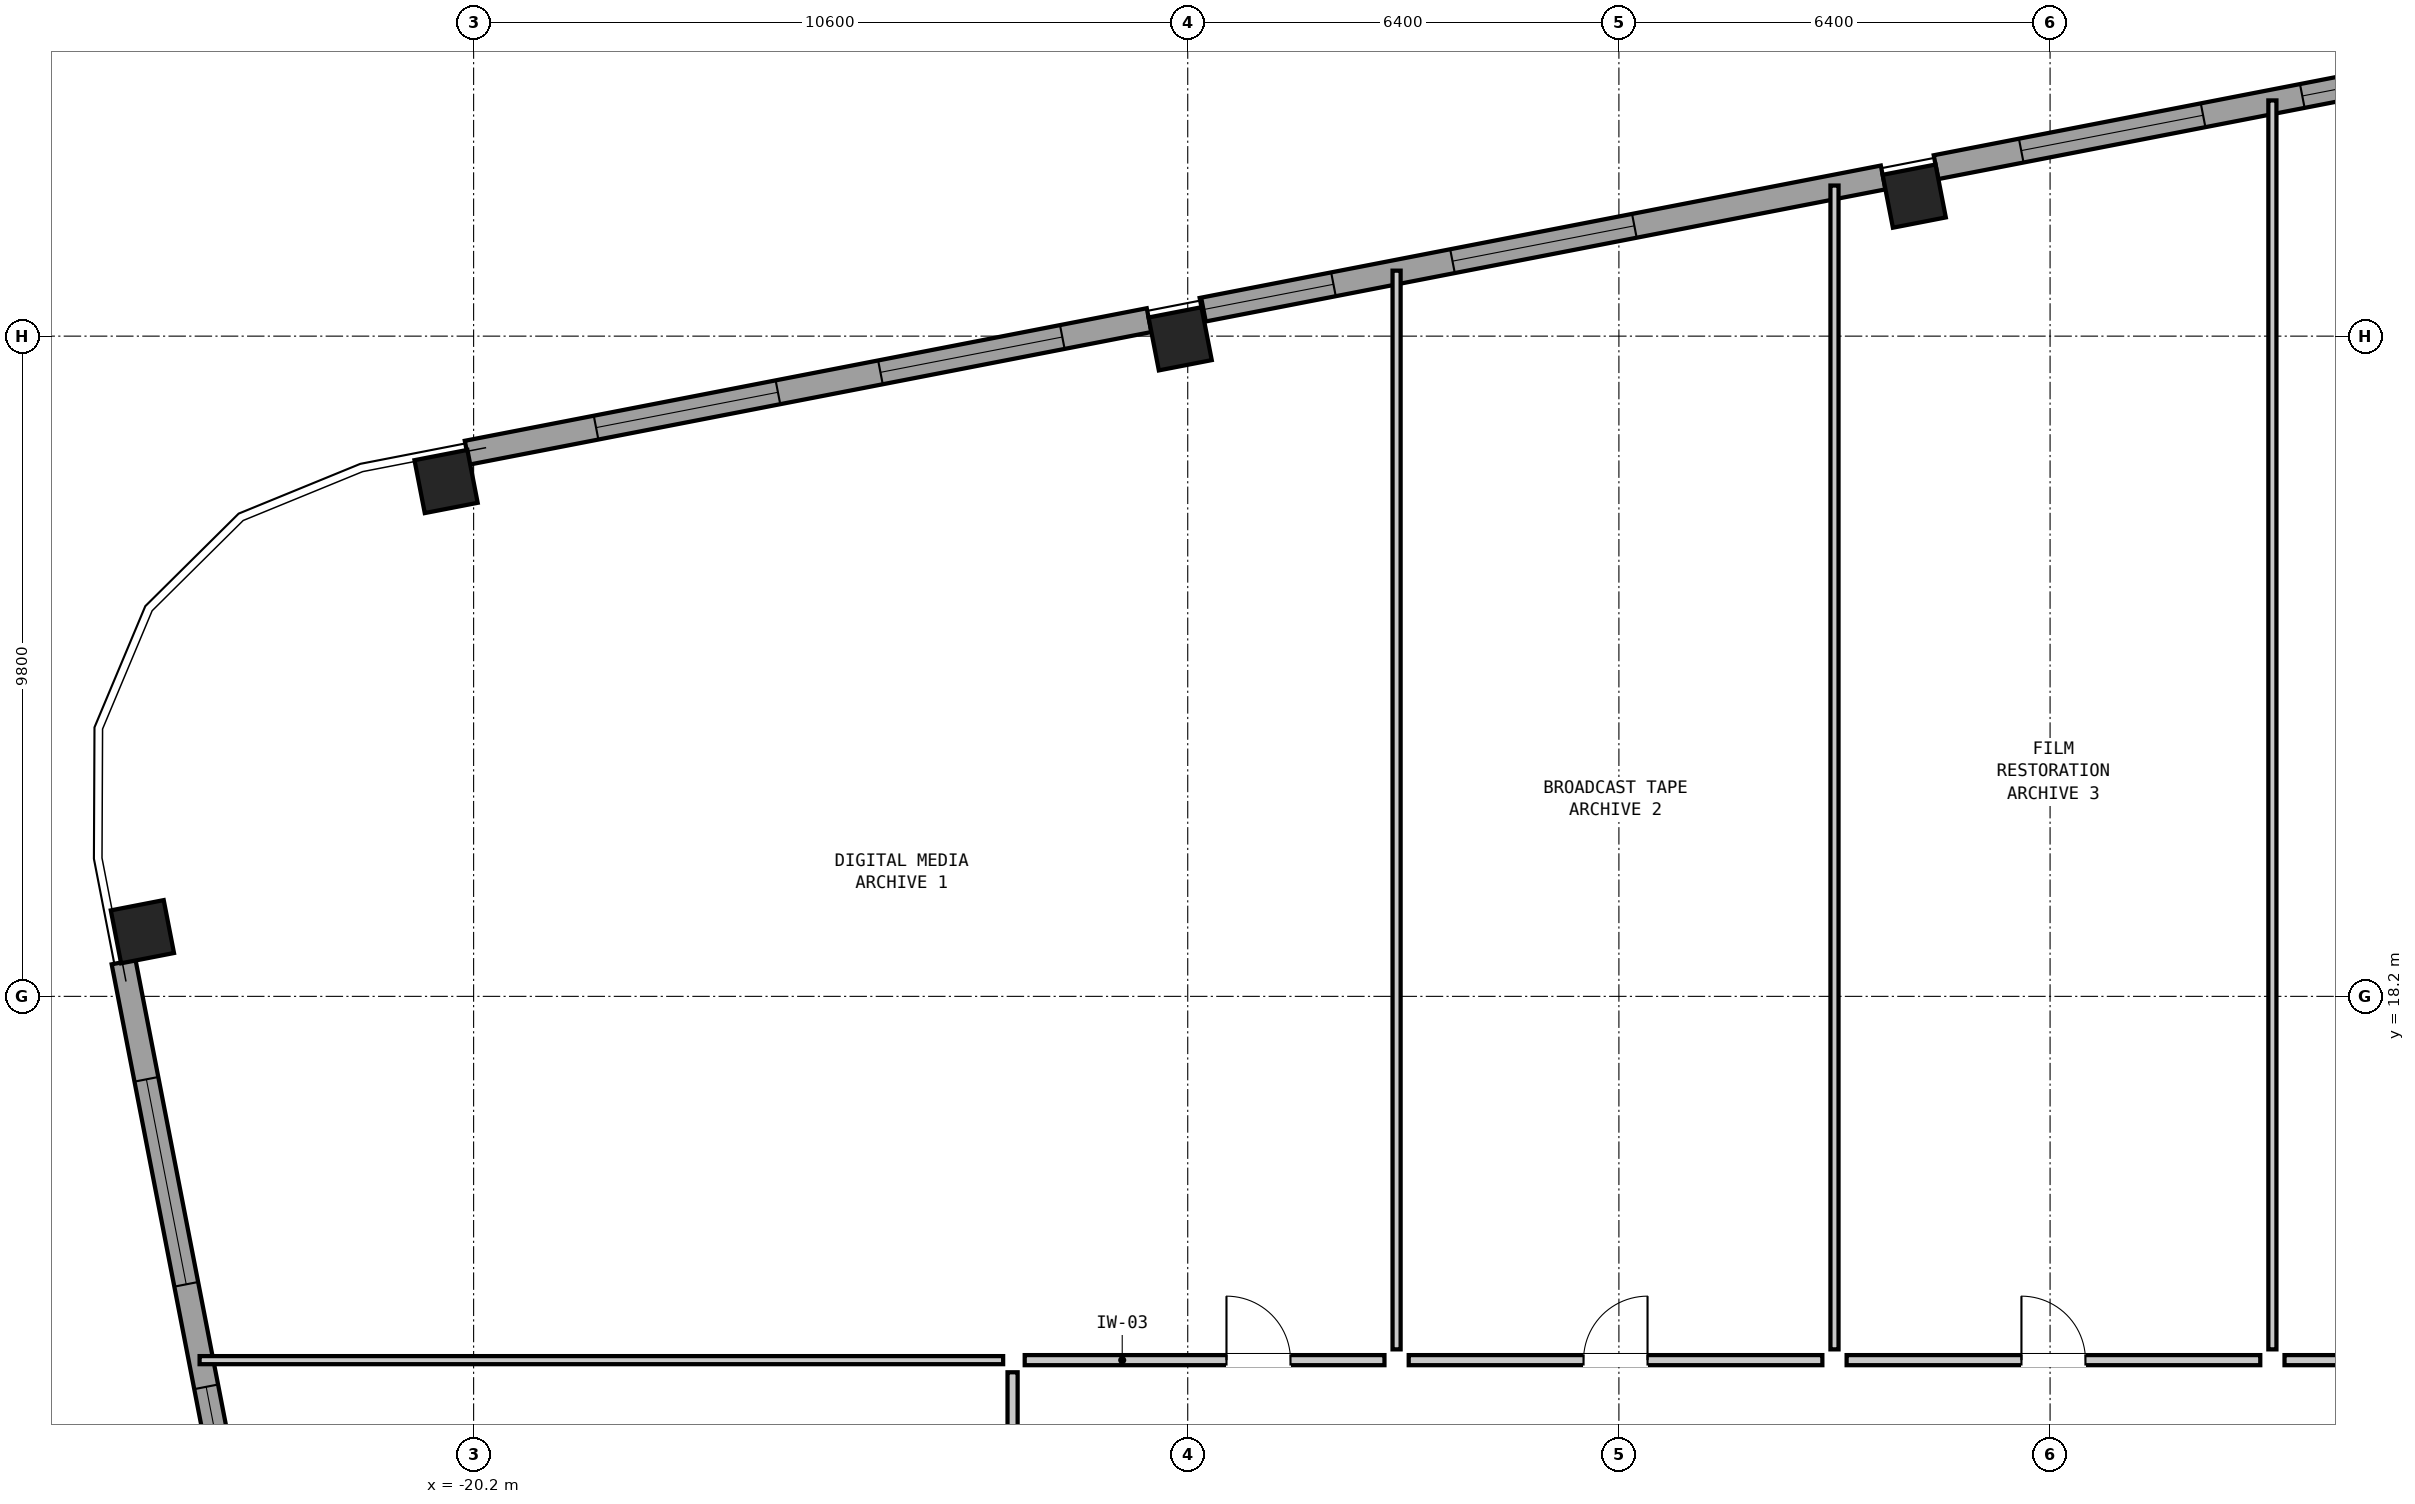
"""IFC4 building model, lengths in metres.
Left out: names, types, materials, properties, quantities, classifications, styles, units other than length and angle.
Written with IfcOpenShell. Run it as: python <this file> out.ifc"""

import sys

from ifc_helpers import new_model, si_unit, direction, frame, frame_2d, origin, origin_2d, place, context, subcontext, project, spatial, rectangle, hollow_rectangle, extrude, element, fill, save


model = new_model("IFC4")
c1 = context("Model", 3, precision=1e-05, world=origin(), true_north=direction((0.0, 1.0)))
c2 = subcontext(c1, "Body", "Model", "MODEL_VIEW")
j1 = project(units=[si_unit("LENGTHUNIT", "METRE"), si_unit("PLANEANGLEUNIT", "RADIAN")], contexts=[c1])
p1 = place(None, origin())
s1 = spatial("IfcSite", under=j1, at=p1, CompositionType="ELEMENT")
p2 = place(p1, origin())
s2 = spatial("IfcBuilding", under=s1, at=p2, CompositionType="ELEMENT")
p3 = place(p2, frame((0.0, 0.0, 134.15)))
s3 = spatial("IfcBuildingStorey", under=s2, at=p3, CompositionType="ELEMENT", Elevation=134.15)
for number, where, z_axis, x_axis in (
    (1, (1.183, 30.078, 0.0), (0.0, 0.0, 1.0), (0.982, 0.191, 0.0)),
    (2, (-9.713, 27.96, 0.0), (0.0, 0.0, 1.0), (0.982, 0.191, 0.0)),
    (3, (-20.609, 25.842, 0.0), (0.0, 0.0, 1.0), (0.982, 0.191, 0.0)),
    (4, (-25.116, 19.159, 0.0), (0.0, 0.0, 1.0), (-0.191, 0.982, 0.0)),
):
    element("IfcColumn", number, at=place(p3, frame(where, z_axis=z_axis, x_axis=x_axis)), inside=s3, PredefinedType="COLUMN", context=c2, shape_type="SweptSolid", body=[
        extrude(hollow_rectangle(XDim=0.8, YDim=0.8, WallThickness=0.05, at=origin_2d()), origin(), (0.0, 0.0, 1.0), 3.05),
    ])
p4 = place(p3, frame((-20.296, 26.27, 0.0), z_axis=(0.0, 0.0, 1.0), x_axis=(0.981628941133, 0.190799952646, 0.0)))
e5 = element("IfcWall", 5, at=p4, inside=s3, PredefinedType="SOLIDWALL", context=c2, shape_type="SweptSolid", body=[
    extrude(rectangle(XDim=10.312, YDim=0.36, at=frame_2d((5.156, 0.0))), origin(), (0.0, 0.0, 1.0), 2.067),
])
p5 = place(p4, frame((1.95, 0.0, 0.2)))
e6 = element("IfcOpeningElement", 6, at=p5, cuts=e5, PredefinedType="OPENING", context=c2, shape_type="SweptSolid", body=[
    extrude(rectangle(XDim=2.75, YDim=0.95, at=frame_2d((1.375, 0.475))), frame((0.0, 0.192, 0.0), z_axis=(0.0, -1.0, 0.0), x_axis=(1.0, 0.0, 0.0)), (0.0, 0.0, 1.0), 0.384),
])
p6 = place(p4, frame((6.25, 0.0, 0.95)))
e7 = element("IfcOpeningElement", 7, at=p6, cuts=e5, PredefinedType="OPENING", context=c2, shape_type="SweptSolid", body=[
    extrude(rectangle(XDim=2.75, YDim=0.95, at=frame_2d((1.375, 0.475))), frame((0.0, 0.192, 0.0), z_axis=(0.0, -1.0, 0.0), x_axis=(1.0, 0.0, 0.0)), (0.0, 0.0, 1.0), 0.384),
])
p7 = place(p3, frame((-9.389, 28.39, 0.0), z_axis=(0.0, 0.0, 1.0), x_axis=(0.981627477005, 0.190807485147, 0.0)))
e8 = element("IfcWall", 8, at=p7, inside=s3, PredefinedType="SOLIDWALL", context=c2, shape_type="SweptSolid", body=[
    extrude(rectangle(XDim=10.3, YDim=0.36, at=frame_2d((5.15, 0.0))), origin(), (0.0, 0.0, 1.0), 2.067),
])
p8 = place(p7, frame((0.038, 0.0, 0.2)))
e9 = element("IfcOpeningElement", 9, at=p8, cuts=e8, PredefinedType="OPENING", context=c2, shape_type="SweptSolid", body=[
    extrude(rectangle(XDim=1.95, YDim=1.1, at=frame_2d((0.975, 0.55))), frame((0.0, 0.192, 0.0), z_axis=(0.0, -1.0, 0.0), x_axis=(1.0, 0.0, 0.0)), (0.0, 0.0, 1.0), 0.384),
])
p9 = place(p7, frame((3.788, 0.0, 0.95)))
e10 = element("IfcOpeningElement", 10, at=p9, cuts=e8, PredefinedType="OPENING", context=c2, shape_type="SweptSolid", body=[
    extrude(rectangle(XDim=2.75, YDim=0.95, at=frame_2d((1.375, 0.475))), frame((0.0, 0.192, 0.0), z_axis=(0.0, -1.0, 0.0), x_axis=(1.0, 0.0, 0.0)), (0.0, 0.0, 1.0), 0.384),
])
p10 = place(p3, frame((1.507, 30.508, 0.0), z_axis=(0.0, 0.0, 1.0), x_axis=(0.981628941133, 0.190799952646, 0.0)))
e11 = element("IfcWall", 11, at=p10, inside=s3, PredefinedType="SOLIDWALL", context=c2, shape_type="SweptSolid", body=[
    extrude(rectangle(XDim=10.312, YDim=0.36, at=frame_2d((5.156, 0.0))), origin(), (0.0, 0.0, 1.0), 2.067),
])
p11 = place(p10, frame((1.288, 0.0, 0.95)))
e12 = element("IfcOpeningElement", 12, at=p11, cuts=e11, PredefinedType="OPENING", context=c2, shape_type="SweptSolid", body=[
    extrude(rectangle(XDim=2.75, YDim=0.95, at=frame_2d((1.375, 0.475))), frame((0.0, 0.192, 0.0), z_axis=(0.0, -1.0, 0.0), x_axis=(1.0, 0.0, 0.0)), (0.0, 0.0, 1.0), 0.384),
])
p12 = place(p10, frame((5.538, 0.0, 0.2)))
e13 = element("IfcOpeningElement", 13, at=p12, cuts=e11, PredefinedType="OPENING", context=c2, shape_type="SweptSolid", body=[
    extrude(rectangle(XDim=2.9, YDim=0.9, at=frame_2d((1.45, 0.45))), frame((0.0, 0.192, 0.0), z_axis=(0.0, -1.0, 0.0), x_axis=(1.0, 0.0, 0.0)), (0.0, 0.0, 1.0), 0.384),
])
p13 = place(p3, frame((-23.428, 8.587, 0.0), z_axis=(0.0, 0.0, 1.0), x_axis=(-0.190822765986, 0.981624506612, 0.0)))
e14 = element("IfcWall", 14, at=p13, inside=s3, PredefinedType="SOLIDWALL", context=c2, shape_type="SweptSolid", body=[
    extrude(rectangle(XDim=10.312, YDim=0.36, at=frame_2d((5.156, 0.0))), origin(), (0.0, 0.0, 1.0), 2.067),
])
p14 = place(p13, frame((1.438, 0.0, 0.8)))
e15 = element("IfcOpeningElement", 15, at=p14, cuts=e14, PredefinedType="OPENING", context=c2, shape_type="SweptSolid", body=[
    extrude(rectangle(XDim=2.45, YDim=1.1, at=frame_2d((1.225, 0.55))), frame((0.0, 0.192, 0.0), z_axis=(0.0, -1.0, 0.0), x_axis=(1.0, 0.0, 0.0)), (0.0, 0.0, 1.0), 0.384),
])
p15 = place(p13, frame((5.438, 0.0, 0.2)))
e16 = element("IfcOpeningElement", 16, at=p15, cuts=e14, PredefinedType="OPENING", context=c2, shape_type="SweptSolid", body=[
    extrude(rectangle(XDim=3.1, YDim=0.9, at=frame_2d((1.55, 0.45))), frame((0.0, 0.192, 0.0), z_axis=(0.0, -1.0, 0.0), x_axis=(1.0, 0.0, 0.0)), (0.0, 0.0, 1.0), 0.384),
])
p16 = place(p3, frame((-24.267, 12.8, 0.0), z_axis=(0.0, 0.0, 1.0), x_axis=(1.0, 0.0, 0.0)))
e17 = element("IfcWall", 17, at=p16, inside=s3, PredefinedType="PARTITIONING", context=c2, shape_type="SweptSolid", body=[
    extrude(rectangle(XDim=11.927, YDim=0.12, at=frame_2d((5.964, 0.0))), origin(), (0.0, 0.0, 1.0), 2.83),
])
p17 = place(p3, frame((-6.5, 12.96, 0.0), z_axis=(0.0, 0.0, 1.0), x_axis=(0.0, 1.0, 0.0)))
e18 = element("IfcWall", 18, at=p17, inside=s3, PredefinedType="PARTITIONING", context=c2, shape_type="SweptSolid", body=[
    extrude(rectangle(XDim=16.012, YDim=0.12, at=frame_2d((8.006, 0.0))), origin(), (0.0, 0.0, 1.0), 2.347),
])
p18 = place(p3, frame((0.0, 12.96, 0.0), z_axis=(0.0, 0.0, 1.0), x_axis=(0.0, 1.0, 0.0)))
e19 = element("IfcWall", 19, at=p18, inside=s3, PredefinedType="PARTITIONING", context=c2, shape_type="SweptSolid", body=[
    extrude(rectangle(XDim=17.275, YDim=0.12, at=frame_2d((8.638, 0.0))), origin(), (0.0, 0.0, 1.0), 2.347),
])
p19 = place(p3, frame((6.5, 12.96, 0.0), z_axis=(0.0, 0.0, 1.0), x_axis=(0.0, 1.0, 0.0)))
e20 = element("IfcWall", 20, at=p19, inside=s3, PredefinedType="PARTITIONING", context=c2, shape_type="SweptSolid", body=[
    extrude(rectangle(XDim=18.539, YDim=0.12, at=frame_2d((9.27, 0.0))), origin(), (0.0, 0.0, 1.0), 2.347),
])
p20 = place(p3, frame((-12.02, 12.8, 0.0), z_axis=(0.0, 0.0, 1.0), x_axis=(1.0, 0.0, 0.0)))
e21 = element("IfcWall", 21, at=p20, inside=s3, PredefinedType="PARTITIONING", context=c2, shape_type="SweptSolid", body=[
    extrude(rectangle(XDim=5.34, YDim=0.15, at=frame_2d((2.67, 0.0))), origin(), (0.0, 0.0, 1.0), 2.83),
])
p21 = place(p20, frame((2.995, 0.0, 0.0)))
e22 = element("IfcOpeningElement", 22, at=p21, cuts=e21, PredefinedType="OPENING", context=c2, shape_type="SweptSolid", body=[
    extrude(rectangle(XDim=0.95, YDim=2.1, at=frame_2d((0.475, 1.05))), frame((0.0, 0.087, 0.0), z_axis=(0.0, -1.0, 0.0), x_axis=(1.0, 0.0, 0.0)), (0.0, 0.0, 1.0), 0.174),
])
p22 = place(p3, frame((-6.32, 12.8, 0.0), z_axis=(0.0, 0.0, 1.0), x_axis=(1.0, 0.0, 0.0)))
e23 = element("IfcWall", 23, at=p22, inside=s3, PredefinedType="PARTITIONING", context=c2, shape_type="SweptSolid", body=[
    extrude(rectangle(XDim=6.14, YDim=0.15, at=frame_2d((3.07, 0.0))), origin(), (0.0, 0.0, 1.0), 2.83),
])
p23 = place(p22, frame((2.595, 0.0, 0.0)))
e24 = element("IfcOpeningElement", 24, at=p23, cuts=e23, PredefinedType="OPENING", context=c2, shape_type="SweptSolid", body=[
    extrude(rectangle(XDim=0.95, YDim=2.1, at=frame_2d((0.475, 1.05))), frame((0.0, 0.087, 0.0), z_axis=(0.0, -1.0, 0.0), x_axis=(1.0, 0.0, 0.0)), (0.0, 0.0, 1.0), 0.174),
])
p24 = place(p3, frame((0.18, 12.8, 0.0), z_axis=(0.0, 0.0, 1.0), x_axis=(1.0, 0.0, 0.0)))
e25 = element("IfcWall", 25, at=p24, inside=s3, PredefinedType="PARTITIONING", context=c2, shape_type="SweptSolid", body=[
    extrude(rectangle(XDim=6.14, YDim=0.15, at=frame_2d((3.07, 0.0))), origin(), (0.0, 0.0, 1.0), 2.83),
])
p25 = place(p24, frame((2.595, 0.0, 0.0)))
e26 = element("IfcOpeningElement", 26, at=p25, cuts=e25, PredefinedType="OPENING", context=c2, shape_type="SweptSolid", body=[
    extrude(rectangle(XDim=0.95, YDim=2.1, at=frame_2d((0.475, 1.05))), frame((0.0, 0.087, 0.0), z_axis=(0.0, -1.0, 0.0), x_axis=(1.0, 0.0, 0.0)), (0.0, 0.0, 1.0), 0.174),
])
p26 = place(p3, frame((6.68, 12.8, 0.0), z_axis=(0.0, 0.0, 1.0), x_axis=(1.0, 0.0, 0.0)))
e27 = element("IfcWall", 27, at=p26, inside=s3, PredefinedType="PARTITIONING", context=c2, shape_type="SweptSolid", body=[
    extrude(rectangle(XDim=5.34, YDim=0.15, at=frame_2d((2.67, 0.0))), origin(), (0.0, 0.0, 1.0), 2.83),
])
p27 = place(p26, frame((1.395, 0.0, 0.0)))
e28 = element("IfcOpeningElement", 28, at=p27, cuts=e27, PredefinedType="OPENING", context=c2, shape_type="SweptSolid", body=[
    extrude(rectangle(XDim=0.95, YDim=2.1, at=frame_2d((0.475, 1.05))), frame((0.0, 0.087, 0.0), z_axis=(0.0, -1.0, 0.0), x_axis=(1.0, 0.0, 0.0)), (0.0, 0.0, 1.0), 0.174),
])
p28 = place(p3, frame((-12.2, 3.68, 0.0), z_axis=(0.0, 0.0, 1.0), x_axis=(0.0, 1.0, 0.0)))
e29 = element("IfcWall", 29, at=p28, inside=s3, PredefinedType="PARTITIONING", context=c2, shape_type="SweptSolid", body=[
    extrude(rectangle(XDim=8.94, YDim=0.15, at=frame_2d((4.47, 0.0))), origin(), (0.0, 0.0, 1.0), 2.83),
])
p29 = place(p28, frame((3.995, 0.0, 0.0)))
e30 = element("IfcOpeningElement", 30, at=p29, cuts=e29, PredefinedType="OPENING", context=c2, shape_type="SweptSolid", body=[
    extrude(rectangle(XDim=0.95, YDim=2.1, at=frame_2d((0.475, 1.05))), frame((0.0, 0.087, 0.0), z_axis=(0.0, -1.0, 0.0), x_axis=(1.0, 0.0, 0.0)), (0.0, 0.0, 1.0), 0.174),
])
p30 = place(p5, origin())
e31 = element("IfcWindow", 31, at=p30, inside=s3, PartitioningType="SINGLE_PANEL", PredefinedType="WINDOW", context=c2, shape_type="SweptSolid", body=[
    extrude(rectangle(XDim=2.75, YDim=0.95, at=frame_2d((1.375, 0.475))), frame((0.0, 0.03, 0.0), z_axis=(0.0, -1.0, 0.0), x_axis=(1.0, 0.0, 0.0)), (0.0, 0.0, 1.0), 0.06),
])
fill(e6, e31)
p31 = place(p6, origin())
e32 = element("IfcWindow", 32, at=p31, inside=s3, PartitioningType="SINGLE_PANEL", PredefinedType="WINDOW", context=c2, shape_type="SweptSolid", body=[
    extrude(rectangle(XDim=2.75, YDim=0.95, at=frame_2d((1.375, 0.475))), frame((0.0, 0.03, 0.0), z_axis=(0.0, -1.0, 0.0), x_axis=(1.0, 0.0, 0.0)), (0.0, 0.0, 1.0), 0.06),
])
fill(e7, e32)
p32 = place(p8, origin())
e33 = element("IfcWindow", 33, at=p32, inside=s3, PartitioningType="SINGLE_PANEL", PredefinedType="WINDOW", context=c2, shape_type="SweptSolid", body=[
    extrude(rectangle(XDim=1.95, YDim=1.1, at=frame_2d((0.975, 0.55))), frame((0.0, 0.03, 0.0), z_axis=(0.0, -1.0, 0.0), x_axis=(1.0, 0.0, 0.0)), (0.0, 0.0, 1.0), 0.06),
])
fill(e9, e33)
p33 = place(p9, origin())
e34 = element("IfcWindow", 34, at=p33, inside=s3, PartitioningType="SINGLE_PANEL", PredefinedType="WINDOW", context=c2, shape_type="SweptSolid", body=[
    extrude(rectangle(XDim=2.75, YDim=0.95, at=frame_2d((1.375, 0.475))), frame((0.0, 0.03, 0.0), z_axis=(0.0, -1.0, 0.0), x_axis=(1.0, 0.0, 0.0)), (0.0, 0.0, 1.0), 0.06),
])
fill(e10, e34)
p34 = place(p11, origin())
e35 = element("IfcWindow", 35, at=p34, inside=s3, PartitioningType="SINGLE_PANEL", PredefinedType="WINDOW", context=c2, shape_type="SweptSolid", body=[
    extrude(rectangle(XDim=2.75, YDim=0.95, at=frame_2d((1.375, 0.475))), frame((0.0, 0.03, 0.0), z_axis=(0.0, -1.0, 0.0), x_axis=(1.0, 0.0, 0.0)), (0.0, 0.0, 1.0), 0.06),
])
fill(e12, e35)
p35 = place(p12, origin())
e36 = element("IfcWindow", 36, at=p35, inside=s3, PartitioningType="SINGLE_PANEL", PredefinedType="WINDOW", context=c2, shape_type="SweptSolid", body=[
    extrude(rectangle(XDim=2.9, YDim=0.9, at=frame_2d((1.45, 0.45))), frame((0.0, 0.03, 0.0), z_axis=(0.0, -1.0, 0.0), x_axis=(1.0, 0.0, 0.0)), (0.0, 0.0, 1.0), 0.06),
])
fill(e13, e36)
p36 = place(p14, origin())
e37 = element("IfcWindow", 37, at=p36, inside=s3, PartitioningType="SINGLE_PANEL", PredefinedType="WINDOW", context=c2, shape_type="SweptSolid", body=[
    extrude(rectangle(XDim=2.45, YDim=1.1, at=frame_2d((1.225, 0.55))), frame((0.0, 0.03, 0.0), z_axis=(0.0, -1.0, 0.0), x_axis=(1.0, 0.0, 0.0)), (0.0, 0.0, 1.0), 0.06),
])
fill(e15, e37)
p37 = place(p15, origin())
e38 = element("IfcWindow", 38, at=p37, inside=s3, PartitioningType="SINGLE_PANEL", PredefinedType="WINDOW", context=c2, shape_type="SweptSolid", body=[
    extrude(rectangle(XDim=3.1, YDim=0.9, at=frame_2d((1.55, 0.45))), frame((0.0, 0.03, 0.0), z_axis=(0.0, -1.0, 0.0), x_axis=(1.0, 0.0, 0.0)), (0.0, 0.0, 1.0), 0.06),
])
fill(e16, e38)
p38 = place(p21, origin())
e39 = element("IfcDoor", 39, at=p38, inside=s3, OperationType="SINGLE_SWING_LEFT", PredefinedType="DOOR", context=c2, shape_type="SweptSolid", body=[
    extrude(rectangle(XDim=0.95, YDim=2.1, at=frame_2d((0.475, 1.05))), frame((0.0, 0.025, 0.0), z_axis=(0.0, -1.0, 0.0), x_axis=(1.0, 0.0, 0.0)), (0.0, 0.0, 1.0), 0.05),
])
fill(e22, e39)
p39 = place(p23, origin())
e40 = element("IfcDoor", 40, at=p39, inside=s3, OperationType="SINGLE_SWING_RIGHT", PredefinedType="DOOR", context=c2, shape_type="SweptSolid", body=[
    extrude(rectangle(XDim=0.95, YDim=2.1, at=frame_2d((0.475, 1.05))), frame((0.0, 0.025, 0.0), z_axis=(0.0, -1.0, 0.0), x_axis=(1.0, 0.0, 0.0)), (0.0, 0.0, 1.0), 0.05),
])
fill(e24, e40)
p40 = place(p25, origin())
e41 = element("IfcDoor", 41, at=p40, inside=s3, OperationType="SINGLE_SWING_LEFT", PredefinedType="DOOR", context=c2, shape_type="SweptSolid", body=[
    extrude(rectangle(XDim=0.95, YDim=2.1, at=frame_2d((0.475, 1.05))), frame((0.0, 0.025, 0.0), z_axis=(0.0, -1.0, 0.0), x_axis=(1.0, 0.0, 0.0)), (0.0, 0.0, 1.0), 0.05),
])
fill(e26, e41)
save(model, sys.argv[1])
